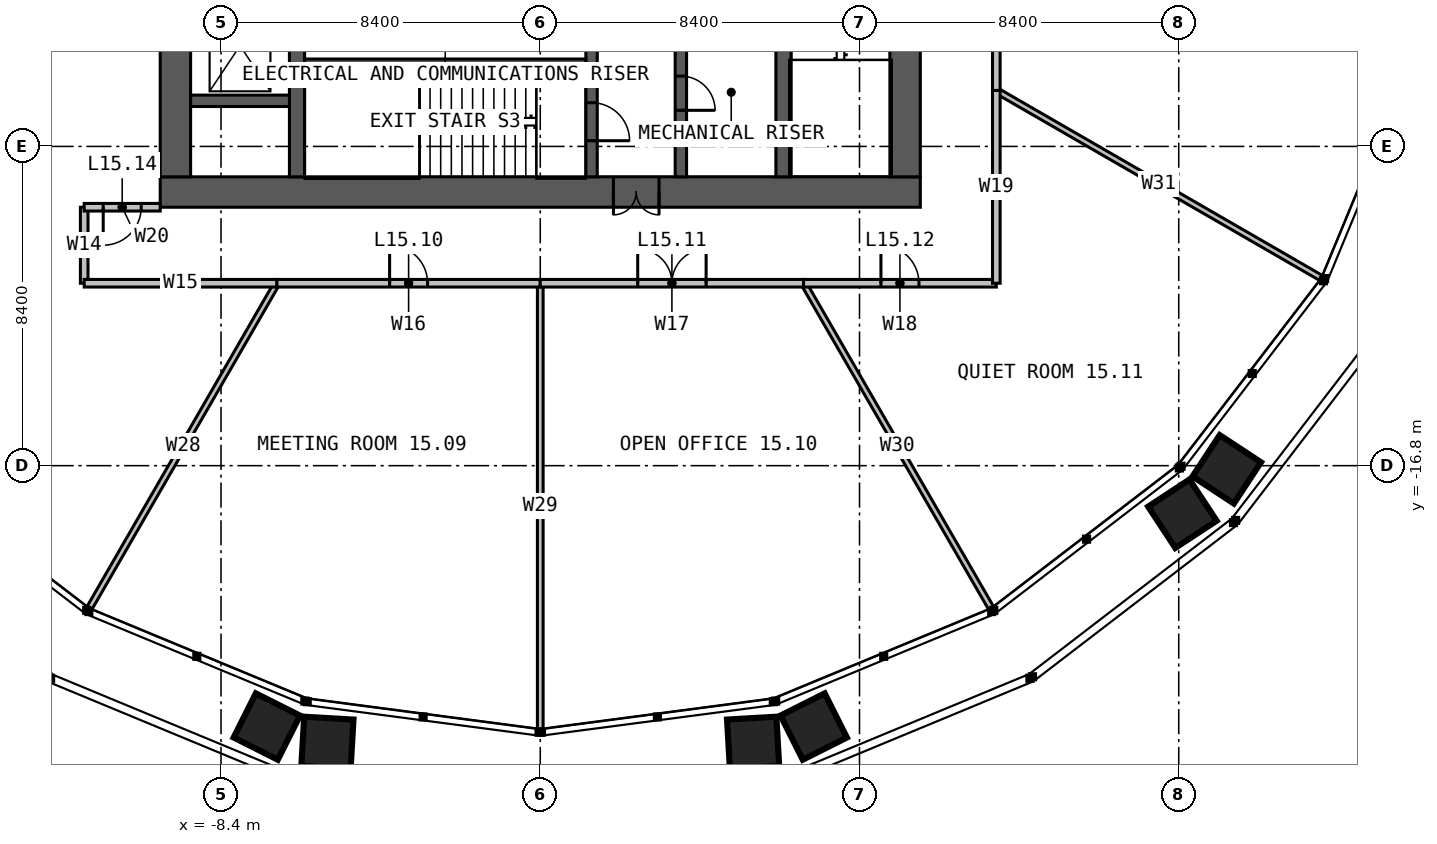
"""IFC4 building model, lengths in metres.
Left out: names, types, materials, properties, quantities, classifications, styles, units other than length and angle.
Written with IfcOpenShell. Run it as: python <this file> out.ifc"""

import sys

from ifc_helpers import new_model, si_unit, direction, frame, frame_2d, origin, place, context, subcontext, project, spatial, rectangle, extrude, element, fill, save


model = new_model("IFC4")
c1 = context("Model", 3, precision=1e-05, world=origin(), true_north=direction((0.0, 1.0)))
c2 = subcontext(c1, "Body", "Model", "MODEL_VIEW")
j1 = project(units=[si_unit("LENGTHUNIT", "METRE"), si_unit("PLANEANGLEUNIT", "RADIAN")], contexts=[c1])
p1 = place(None, origin())
s1 = spatial("IfcSite", under=j1, at=p1, CompositionType="ELEMENT")
p2 = place(p1, origin())
s2 = spatial("IfcBuilding", under=s1, at=p2, CompositionType="ELEMENT")
p3 = place(p2, frame((0.0, 0.0, 65.0)))
s3 = spatial("IfcBuildingStorey", under=s2, at=p3, CompositionType="ELEMENT", Elevation=65.0)
p4 = place(p3, frame((10.0, -9.6, 0.0), z_axis=(0.0, 0.0, 1.0), x_axis=(-1.0, 0.0, 0.0)))
e1 = element("IfcWall", 1, at=p4, inside=s3, PredefinedType="SOLIDWALL", context=c2, shape_type="SweptSolid", body=[
    extrude(rectangle(XDim=20.0, YDim=0.8, at=frame_2d((10.0, 0.0))), origin(), (0.0, 0.0, 1.0), 4.0),
])
p5 = place(p4, frame((6.875, 0.0, 0.0)))
e2 = element("IfcOpeningElement", 2, at=p5, cuts=e1, PredefinedType="OPENING", context=c2, shape_type="SweptSolid", body=[
    extrude(rectangle(XDim=1.2, YDim=2.2, at=frame_2d((0.6, 1.1))), frame((0.0, 0.41, 0.0), z_axis=(0.0, -1.0, 0.0), x_axis=(1.0, 0.0, 0.0)), (0.0, 0.0, 1.0), 0.82),
])
for number, where, z_axis, x_axis in (
    (3, (9.6, -9.2, 0.0), (0.0, 0.0, 1.0), (0.0, 1.0, 0.0)),
    (4, (-9.6, 9.2, 0.0), (0.0, 0.0, 1.0), (0.0, -1.0, 0.0)),
):
    element("IfcWall", number, at=place(p3, frame(where, z_axis=z_axis, x_axis=x_axis)), inside=s3, PredefinedType="SOLIDWALL", context=c2, shape_type="SweptSolid", body=[
        extrude(rectangle(XDim=18.4, YDim=0.8, at=frame_2d((9.2, 0.0))), origin(), (0.0, 0.0, 1.0), 4.0),
    ])
p6 = place(p3, frame((-6.4, -9.2, 0.0), z_axis=(0.0, 0.0, 1.0), x_axis=(0.0, 1.0, 0.0)))
e5 = element("IfcWall", 5, at=p6, inside=s3, PredefinedType="SOLIDWALL", context=c2, shape_type="SweptSolid", body=[
    extrude(rectangle(XDim=18.4, YDim=0.4, at=frame_2d((9.2, 0.0))), origin(), (0.0, 0.0, 1.0), 4.0),
])
p7 = place(p6, frame((8.7, 0.0, 0.0)))
e6 = element("IfcOpeningElement", 6, at=p7, cuts=e5, PredefinedType="OPENING", context=c2, shape_type="SweptSolid", body=[
    extrude(rectangle(XDim=1.0, YDim=2.2, at=frame_2d((0.5, 1.1))), frame((0.0, 0.21, 0.0), z_axis=(0.0, -1.0, 0.0), x_axis=(1.0, 0.0, 0.0)), (0.0, 0.0, 1.0), 0.42),
])
p8 = place(p3, frame((6.4, 9.2, 0.0), z_axis=(0.0, 0.0, 1.0), x_axis=(0.0, -1.0, 0.0)))
e7 = element("IfcWall", 7, at=p8, inside=s3, PredefinedType="SOLIDWALL", context=c2, shape_type="SweptSolid", body=[
    extrude(rectangle(XDim=18.4, YDim=0.4, at=frame_2d((9.2, 0.0))), origin(), (0.0, 0.0, 1.0), 4.0),
])
p9 = place(p8, frame((8.7, 0.0, 0.0)))
e8 = element("IfcOpeningElement", 8, at=p9, cuts=e7, PredefinedType="OPENING", context=c2, shape_type="SweptSolid", body=[
    extrude(rectangle(XDim=1.0, YDim=2.2, at=frame_2d((0.5, 1.1))), frame((0.0, 0.21, 0.0), z_axis=(0.0, -1.0, 0.0), x_axis=(1.0, 0.0, 0.0)), (0.0, 0.0, 1.0), 0.42),
])
p10 = place(p3, frame((1.35, -1.45, 0.0), z_axis=(0.0, 0.0, 1.0), x_axis=(0.0, -1.0, 0.0)))
e9 = element("IfcWall", 9, at=p10, inside=s3, PredefinedType="SOLIDWALL", context=c2, shape_type="SweptSolid", body=[
    extrude(rectangle(XDim=7.75, YDim=0.3, at=frame_2d((3.875, 0.0))), origin(), (0.0, 0.0, 1.0), 4.0),
])
p11 = place(p10, frame((5.8, 0.0, 0.0)))
e10 = element("IfcOpeningElement", 10, at=p11, cuts=e9, PredefinedType="OPENING", context=c2, shape_type="SweptSolid", body=[
    extrude(rectangle(XDim=1.0, YDim=2.2, at=frame_2d((0.5, 1.1))), frame((0.0, 0.16, 0.0), z_axis=(0.0, -1.0, 0.0), x_axis=(1.0, 0.0, 0.0)), (0.0, 0.0, 1.0), 0.32),
])
p12 = place(p10, frame((3.525, 0.0, 0.0)))
e11 = element("IfcOpeningElement", 11, at=p12, cuts=e9, PredefinedType="OPENING", context=c2, shape_type="SweptSolid", body=[
    extrude(rectangle(XDim=0.9, YDim=2.2, at=frame_2d((0.45, 1.1))), frame((0.0, 0.16, 0.0), z_axis=(0.0, -1.0, 0.0), x_axis=(1.0, 0.0, 0.0)), (0.0, 0.0, 1.0), 0.32),
])
p13 = place(p3, frame((3.7, -1.45, 0.0), z_axis=(0.0, 0.0, 1.0), x_axis=(0.0, -1.0, 0.0)))
e12 = element("IfcWall", 12, at=p13, inside=s3, PredefinedType="SOLIDWALL", context=c2, shape_type="SweptSolid", body=[
    extrude(rectangle(XDim=7.75, YDim=0.3, at=frame_2d((3.875, 0.0))), origin(), (0.0, 0.0, 1.0), 4.0),
])
p14 = place(p13, frame((5.1, 0.0, 0.0)))
e13 = element("IfcOpeningElement", 13, at=p14, cuts=e12, PredefinedType="OPENING", context=c2, shape_type="SweptSolid", body=[
    extrude(rectangle(XDim=0.9, YDim=2.2, at=frame_2d((0.45, 1.1))), frame((0.0, 0.16, 0.0), z_axis=(0.0, -1.0, 0.0), x_axis=(1.0, 0.0, 0.0)), (0.0, 0.0, 1.0), 0.32),
])
p15 = place(p3, frame((-6.2, -6.2, 0.0), z_axis=(0.0, 0.0, 1.0), x_axis=(1.0, 0.0, 0.0)))
e14 = element("IfcWall", 14, at=p15, inside=s3, PredefinedType="SOLIDWALL", context=c2, shape_type="SweptSolid", body=[
    extrude(rectangle(XDim=7.4, YDim=0.2, at=frame_2d((3.7, 0.0))), origin(), (0.0, 0.0, 1.0), 4.0),
])
p16 = place(p3, frame((-9.2, -7.2, 0.0), z_axis=(0.0, 0.0, 1.0), x_axis=(1.0, 0.0, 0.0)))
e15 = element("IfcWall", 15, at=p16, inside=s3, PredefinedType="SOLIDWALL", context=c2, shape_type="SweptSolid", body=[
    extrude(rectangle(XDim=2.6, YDim=0.3, at=frame_2d((1.3, 0.0))), origin(), (0.0, 0.0, 1.0), 4.0),
])
for number, where, z_axis, x_axis in (
    (16, (12.0, -6.928, 0.0), (0.0, 0.0, 1.0), (0.866, -0.5, 0.0)),
    (17, (-6.928, -12.0, 0.0), (0.0, 0.0, 1.0), (-0.5, -0.866, 0.0)),
):
    element("IfcWall", number, at=place(p3, frame(where, z_axis=z_axis, x_axis=x_axis)), inside=s3, PredefinedType="PARTITIONING", context=c2, shape_type="SweptSolid", body=[
        extrude(rectangle(XDim=9.87, YDim=0.15, at=frame_2d((4.935, 0.0))), origin(), (0.0, 0.0, 1.0), 2.79),
    ])
p17 = place(p3, frame((0.0, -12.0, 0.0), z_axis=(0.0, 0.0, 1.0), x_axis=(0.0, -1.0, 0.0)))
e18 = element("IfcWall", 18, at=p17, inside=s3, PredefinedType="PARTITIONING", context=c2, shape_type="SweptSolid", body=[
    extrude(rectangle(XDim=11.726, YDim=0.15, at=frame_2d((5.863, 0.0))), origin(), (0.0, 0.0, 1.0), 2.79),
])
p18 = place(p3, frame((6.928, -12.0, 0.0), z_axis=(0.0, 0.0, 1.0), x_axis=(0.499988678145, -0.866031940362, 0.0)))
e19 = element("IfcWall", 19, at=p18, inside=s3, PredefinedType="PARTITIONING", context=c2, shape_type="SweptSolid", body=[
    extrude(rectangle(XDim=9.87, YDim=0.15, at=frame_2d((4.935, 0.0))), origin(), (0.0, 0.0, 1.0), 2.79),
])
p19 = place(p3, frame((12.0, -6.928, 0.0), z_axis=(0.0, 0.0, 1.0), x_axis=(0.0, 1.0, 0.0)))
e20 = element("IfcWall", 20, at=p19, inside=s3, PredefinedType="PARTITIONING", context=c2, shape_type="SweptSolid", body=[
    extrude(rectangle(XDim=6.928, YDim=0.2, at=frame_2d((3.464, 0.0))), origin(), (0.0, 0.0, 1.0), 3.8),
])
p20 = place(p19, frame((2.564, 0.0, 0.0)))
e21 = element("IfcOpeningElement", 21, at=p20, cuts=e20, PredefinedType="OPENING", context=c2, shape_type="SweptSolid", body=[
    extrude(rectangle(XDim=1.8, YDim=2.2, at=frame_2d((0.9, 1.1))), frame((0.0, 0.11, 0.0), z_axis=(0.0, -1.0, 0.0), x_axis=(1.0, 0.0, 0.0)), (0.0, 0.0, 1.0), 0.22),
])
p21 = place(p3, frame((-12.0, -10.0, 0.0), z_axis=(0.0, 0.0, 1.0), x_axis=(0.0, -1.0, 0.0)))
e22 = element("IfcWall", 22, at=p21, inside=s3, PredefinedType="PARTITIONING", context=c2, shape_type="SweptSolid", body=[
    extrude(rectangle(XDim=2.0, YDim=0.2, at=frame_2d((1.0, 0.0))), origin(), (0.0, 0.0, 1.0), 3.8),
])
p22 = place(p3, frame((-12.0, -12.0, 0.0), z_axis=(0.0, 0.0, 1.0), x_axis=(1.0, 0.0, 0.0)))
e23 = element("IfcWall", 23, at=p22, inside=s3, PredefinedType="PARTITIONING", context=c2, shape_type="SweptSolid", body=[
    extrude(rectangle(XDim=5.072, YDim=0.2, at=frame_2d((2.536, 0.0))), origin(), (0.0, 0.0, 1.0), 3.8),
])
p23 = place(p3, frame((-6.928, -12.0, 0.0), z_axis=(0.0, 0.0, 1.0), x_axis=(1.0, 0.0, 0.0)))
e24 = element("IfcWall", 24, at=p23, inside=s3, PredefinedType="PARTITIONING", context=c2, shape_type="SweptSolid", body=[
    extrude(rectangle(XDim=6.928, YDim=0.2, at=frame_2d((3.464, 0.0))), origin(), (0.0, 0.0, 1.0), 3.8),
])
p24 = place(p23, frame((2.964, 0.0, 0.0)))
e25 = element("IfcOpeningElement", 25, at=p24, cuts=e24, PredefinedType="OPENING", context=c2, shape_type="SweptSolid", body=[
    extrude(rectangle(XDim=1.0, YDim=2.2, at=frame_2d((0.5, 1.1))), frame((0.0, 0.11, 0.0), z_axis=(0.0, -1.0, 0.0), x_axis=(1.0, 0.0, 0.0)), (0.0, 0.0, 1.0), 0.22),
])
p25 = place(p3, frame((0.0, -12.0, 0.0), z_axis=(0.0, 0.0, 1.0), x_axis=(1.0, 0.0, 0.0)))
e26 = element("IfcWall", 26, at=p25, inside=s3, PredefinedType="PARTITIONING", context=c2, shape_type="SweptSolid", body=[
    extrude(rectangle(XDim=6.928, YDim=0.2, at=frame_2d((3.464, 0.0))), origin(), (0.0, 0.0, 1.0), 3.8),
])
p26 = place(p25, frame((2.564, 0.0, 0.0)))
e27 = element("IfcOpeningElement", 27, at=p26, cuts=e26, PredefinedType="OPENING", context=c2, shape_type="SweptSolid", body=[
    extrude(rectangle(XDim=1.8, YDim=2.2, at=frame_2d((0.9, 1.1))), frame((0.0, 0.11, 0.0), z_axis=(0.0, -1.0, 0.0), x_axis=(1.0, 0.0, 0.0)), (0.0, 0.0, 1.0), 0.22),
])
p27 = place(p3, frame((6.928, -12.0, 0.0), z_axis=(0.0, 0.0, 1.0), x_axis=(1.0, 0.0, 0.0)))
e28 = element("IfcWall", 28, at=p27, inside=s3, PredefinedType="PARTITIONING", context=c2, shape_type="SweptSolid", body=[
    extrude(rectangle(XDim=5.072, YDim=0.2, at=frame_2d((2.536, 0.0))), origin(), (0.0, 0.0, 1.0), 3.8),
])
p28 = place(p27, frame((2.036, 0.0, 0.0)))
e29 = element("IfcOpeningElement", 29, at=p28, cuts=e28, PredefinedType="OPENING", context=c2, shape_type="SweptSolid", body=[
    extrude(rectangle(XDim=1.0, YDim=2.2, at=frame_2d((0.5, 1.1))), frame((0.0, 0.11, 0.0), z_axis=(0.0, -1.0, 0.0), x_axis=(1.0, 0.0, 0.0)), (0.0, 0.0, 1.0), 0.22),
])
p29 = place(p3, frame((12.0, -12.0, 0.0), z_axis=(0.0, 0.0, 1.0), x_axis=(0.0, 1.0, 0.0)))
e30 = element("IfcWall", 30, at=p29, inside=s3, PredefinedType="PARTITIONING", context=c2, shape_type="SweptSolid", body=[
    extrude(rectangle(XDim=5.072, YDim=0.2, at=frame_2d((2.536, 0.0))), origin(), (0.0, 0.0, 1.0), 3.8),
])
p30 = place(p3, frame((-10.0, -10.0, 0.0), z_axis=(0.0, 0.0, 1.0), x_axis=(-1.0, 0.0, 0.0)))
e31 = element("IfcWall", 31, at=p30, inside=s3, PredefinedType="PARTITIONING", context=c2, shape_type="SweptSolid", body=[
    extrude(rectangle(XDim=2.0, YDim=0.2, at=frame_2d((1.0, 0.0))), origin(), (0.0, 0.0, 1.0), 3.8),
])
p31 = place(p30, frame((0.5, 0.0, 0.0)))
e32 = element("IfcOpeningElement", 32, at=p31, cuts=e31, PredefinedType="OPENING", context=c2, shape_type="SweptSolid", body=[
    extrude(rectangle(XDim=1.0, YDim=2.2, at=frame_2d((0.5, 1.1))), frame((0.0, 0.11, 0.0), z_axis=(0.0, -1.0, 0.0), x_axis=(1.0, 0.0, 0.0)), (0.0, 0.0, 1.0), 0.22),
])
p32 = place(p5, origin())
e33 = element("IfcDoor", 33, at=p32, inside=s3, OperationType="DOUBLE_DOOR_SINGLE_SWING", PredefinedType="DOOR", context=c2, shape_type="SweptSolid", body=[
    extrude(rectangle(XDim=1.2, YDim=2.2, at=frame_2d((0.6, 1.1))), frame((0.0, 0.025, 0.0), z_axis=(0.0, -1.0, 0.0), x_axis=(1.0, 0.0, 0.0)), (0.0, 0.0, 1.0), 0.05),
])
fill(e2, e33)
p33 = place(p11, origin())
e34 = element("IfcDoor", 34, at=p33, inside=s3, OperationType="SINGLE_SWING_RIGHT", PredefinedType="DOOR", context=c2, shape_type="SweptSolid", body=[
    extrude(rectangle(XDim=1.0, YDim=2.2, at=frame_2d((0.5, 1.1))), frame((0.0, 0.025, 0.0), z_axis=(0.0, -1.0, 0.0), x_axis=(1.0, 0.0, 0.0)), (0.0, 0.0, 1.0), 0.05),
])
fill(e10, e34)
p34 = place(p14, origin())
e35 = element("IfcDoor", 35, at=p34, inside=s3, OperationType="SINGLE_SWING_RIGHT", PredefinedType="DOOR", context=c2, shape_type="SweptSolid", body=[
    extrude(rectangle(XDim=0.9, YDim=2.2, at=frame_2d((0.45, 1.1))), frame((0.0, 0.025, 0.0), z_axis=(0.0, -1.0, 0.0), x_axis=(1.0, 0.0, 0.0)), (0.0, 0.0, 1.0), 0.05),
])
fill(e13, e35)
p35 = place(p24, origin())
e36 = element("IfcDoor", 36, at=p35, inside=s3, OperationType="SINGLE_SWING_LEFT", PredefinedType="DOOR", context=c2, shape_type="SweptSolid", body=[
    extrude(rectangle(XDim=1.0, YDim=2.2, at=frame_2d((0.5, 1.1))), frame((0.0, 0.025, 0.0), z_axis=(0.0, -1.0, 0.0), x_axis=(1.0, 0.0, 0.0)), (0.0, 0.0, 1.0), 0.05),
])
fill(e25, e36)
p36 = place(p26, origin())
e37 = element("IfcDoor", 37, at=p36, inside=s3, OperationType="DOUBLE_DOOR_SINGLE_SWING", PredefinedType="DOOR", context=c2, shape_type="SweptSolid", body=[
    extrude(rectangle(XDim=1.8, YDim=2.2, at=frame_2d((0.9, 1.1))), frame((0.0, 0.025, 0.0), z_axis=(0.0, -1.0, 0.0), x_axis=(1.0, 0.0, 0.0)), (0.0, 0.0, 1.0), 0.05),
])
fill(e27, e37)
p37 = place(p28, origin())
e38 = element("IfcDoor", 38, at=p37, inside=s3, OperationType="SINGLE_SWING_LEFT", PredefinedType="DOOR", context=c2, shape_type="SweptSolid", body=[
    extrude(rectangle(XDim=1.0, YDim=2.2, at=frame_2d((0.5, 1.1))), frame((0.0, 0.025, 0.0), z_axis=(0.0, -1.0, 0.0), x_axis=(1.0, 0.0, 0.0)), (0.0, 0.0, 1.0), 0.05),
])
fill(e29, e38)
p38 = place(p31, origin())
e39 = element("IfcDoor", 39, at=p38, inside=s3, OperationType="SINGLE_SWING_RIGHT", PredefinedType="DOOR", context=c2, shape_type="SweptSolid", body=[
    extrude(rectangle(XDim=1.0, YDim=2.2, at=frame_2d((0.5, 1.1))), frame((0.0, 0.025, 0.0), z_axis=(0.0, -1.0, 0.0), x_axis=(1.0, 0.0, 0.0)), (0.0, 0.0, 1.0), 0.05),
])
fill(e32, e39)
save(model, sys.argv[1])
